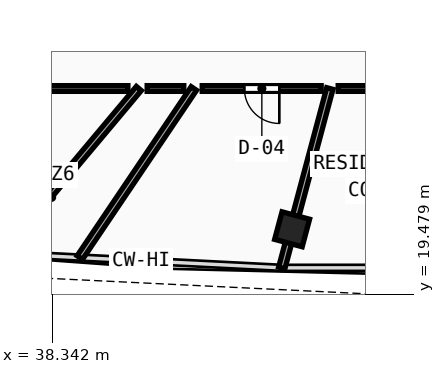
"""IFC4 building model, lengths in metres.
Left out: names, types, materials, properties, quantities, classifications, styles, units other than length and angle.
Written with IfcOpenShell. Run it as: python <this file> out.ifc"""

import sys

from ifc_helpers import new_model, si_unit, direction, frame, frame_2d, origin, origin_with_axes, origin_2d, place, context, subcontext, project, spatial, rectangle, hollow_rectangle, extrude, source, transform, mapped, element, fill, save


model = new_model("IFC4")
c1 = context("Model", 3, precision=1e-05, world=origin(), true_north=direction((0.0, 1.0)))
c2 = subcontext(c1, "Body", "Model", "MODEL_VIEW")
j1 = project(units=[si_unit("LENGTHUNIT", "METRE"), si_unit("PLANEANGLEUNIT", "RADIAN")], contexts=[c1])
p1 = place(None, origin())
s1 = spatial("IfcSite", under=j1, at=p1, CompositionType="ELEMENT")
p2 = place(p1, origin())
s2 = spatial("IfcBuilding", under=s1, at=p2, CompositionType="ELEMENT")
p3 = place(p2, frame((0.0, 0.0, 311.13)))
s3 = spatial("IfcBuildingStorey", under=s2, at=p3, CompositionType="ELEMENT", Elevation=311.13)
m1 = source(origin(), c2, "Body", "SweptSolid", [
    extrude(hollow_rectangle(XDim=0.75, YDim=0.75, WallThickness=0.028, at=origin_2d()), origin(), (0.0, 0.0, 1.0), 3.73),
])
p4 = place(p3, frame((44.649, 21.196, -0.26), z_axis=(0.0, 0.0, 1.0), x_axis=(0.965925826289, -0.258819045103, 0.0)))
e1 = element("IfcColumn", 1, at=p4, inside=s3, PredefinedType="COLUMN", context=c2, shape_type="MappedRepresentation", body=[
    mapped(m1, transform((0.0, 0.0, 0.0), scale=1.0)),
])
p5 = place(p3, frame((40.616, 24.9, 0.0), z_axis=(0.0, 0.0, 1.0), x_axis=(-0.642790029712, -0.76604241247, 0.0)))
e2 = element("IfcWall", 2, at=p5, inside=s3, PredefinedType="PARTITIONING", context=c2, shape_type="SweptSolid", body=[
    extrude(rectangle(XDim=5.669, YDim=0.17, at=frame_2d((2.834, 0.0))), origin(), (0.0, 0.0, 1.0), 2.87),
])
p6 = place(p3, frame((42.064, 24.9, 0.0), z_axis=(0.0, 0.0, 1.0), x_axis=(-0.559175120789, -0.829049566848, 0.0)))
e3 = element("IfcWall", 3, at=p6, inside=s3, PredefinedType="PARTITIONING", context=c2, shape_type="SweptSolid", body=[
    extrude(rectangle(XDim=5.366, YDim=0.17, at=frame_2d((2.683, 0.0))), origin(), (0.0, 0.0, 1.0), 2.87),
])
p7 = place(p3, frame((45.642, 24.9, 0.0), z_axis=(0.0, 0.0, 1.0), x_axis=(-0.258835177065, -0.965921503598, 0.0)))
e4 = element("IfcWall", 4, at=p7, inside=s3, PredefinedType="PARTITIONING", context=c2, shape_type="SweptSolid", body=[
    extrude(rectangle(XDim=4.885, YDim=0.17, at=frame_2d((2.442, 0.0))), origin(), (0.0, 0.0, 1.0), 2.87),
])
p8 = place(p3, frame((55.164, 24.9, 0.0), z_axis=(0.0, 0.0, 1.0), x_axis=(-1.0, 0.0, 0.0)))
e5 = element("IfcWall", 5, at=p8, inside=s3, PredefinedType="PARTITIONING", context=c2, shape_type="SweptSolid", body=[
    extrude(rectangle(XDim=9.302, YDim=0.15, at=frame_2d((4.651, 0.0))), origin(), (0.0, 0.0, 1.0), 2.87),
])
p9 = place(p8, frame((4.176, 0.0, 0.0)))
e6 = element("IfcOpeningElement", 6, at=p9, cuts=e5, PredefinedType="OPENING", context=c2, shape_type="SweptSolid", body=[
    extrude(rectangle(XDim=0.98, YDim=2.12, at=frame_2d((0.49, 1.06))), frame((0.0, 0.085, 0.0), z_axis=(0.0, -1.0, 0.0), x_axis=(1.0, 0.0, 0.0)), (0.0, 0.0, 1.0), 0.17),
])
p10 = place(p3, frame((45.414, 24.9, 0.0), z_axis=(0.0, 0.0, 1.0), x_axis=(-1.0, 0.0, 0.0)))
e7 = element("IfcWall", 7, at=p10, inside=s3, PredefinedType="PARTITIONING", context=c2, shape_type="SweptSolid", body=[
    extrude(rectangle(XDim=3.13, YDim=0.15, at=frame_2d((1.565, 0.0))), origin(), (0.0, 0.0, 1.0), 3.47),
])
p11 = place(p10, frame((1.101, 0.0, 0.0)))
e8 = element("IfcOpeningElement", 8, at=p11, cuts=e7, PredefinedType="OPENING", context=c2, shape_type="SweptSolid", body=[
    extrude(rectangle(XDim=0.92, YDim=2.1, at=frame_2d((0.46, 1.05))), frame((0.0, 0.085, 0.0), z_axis=(0.0, -1.0, 0.0), x_axis=(1.0, 0.0, 0.0)), (0.0, 0.0, 1.0), 0.17),
])
p12 = place(p3, frame((41.799, 24.9, 0.0), z_axis=(0.0, 0.0, 1.0), x_axis=(-1.0, 0.0, 0.0)))
e9 = element("IfcWall", 9, at=p12, inside=s3, PredefinedType="PARTITIONING", context=c2, shape_type="SweptSolid", body=[
    extrude(rectangle(XDim=0.963, YDim=0.15, at=frame_2d((0.481, 0.0))), origin(), (0.0, 0.0, 1.0), 3.47),
])
p13 = place(p3, frame((40.329, 24.9, 0.0), z_axis=(0.0, 0.0, 1.0), x_axis=(-1.0, 0.0, 0.0)))
e10 = element("IfcWall", 10, at=p13, inside=s3, PredefinedType="PARTITIONING", context=c2, shape_type="SweptSolid", body=[
    extrude(rectangle(XDim=7.179, YDim=0.15, at=frame_2d((3.589, 0.0))), origin(), (0.0, 0.0, 1.0), 3.12),
])
p14 = place(p13, frame((3.201, 0.0, 0.0)))
e11 = element("IfcOpeningElement", 11, at=p14, cuts=e10, PredefinedType="OPENING", context=c2, shape_type="SweptSolid", body=[
    extrude(rectangle(XDim=0.98, YDim=2.12, at=frame_2d((0.49, 1.06))), frame((0.0, 0.085, 0.0), z_axis=(0.0, -1.0, 0.0), x_axis=(1.0, 0.0, 0.0)), (0.0, 0.0, 1.0), 0.17),
])
m2 = source(origin(), c2, "Body", "SweptSolid", [
    extrude(rectangle(XDim=0.92, YDim=2.1, at=frame_2d((0.46, 1.05))), frame((0.0, 0.025, 0.0), z_axis=(0.0, -1.0, 0.0), x_axis=(1.0, 0.0, 0.0)), (0.0, 0.0, 1.0), 0.05),
])
p15 = place(p11, origin_with_axes())
e12 = element("IfcDoor", 12, at=p15, inside=s3, OperationType="SINGLE_SWING_LEFT", PredefinedType="DOOR", context=c2, shape_type="MappedRepresentation", body=[
    mapped(m2, transform((0.0, 0.0, 0.0), scale=1.0)),
])
fill(e8, e12)
save(model, sys.argv[1])
